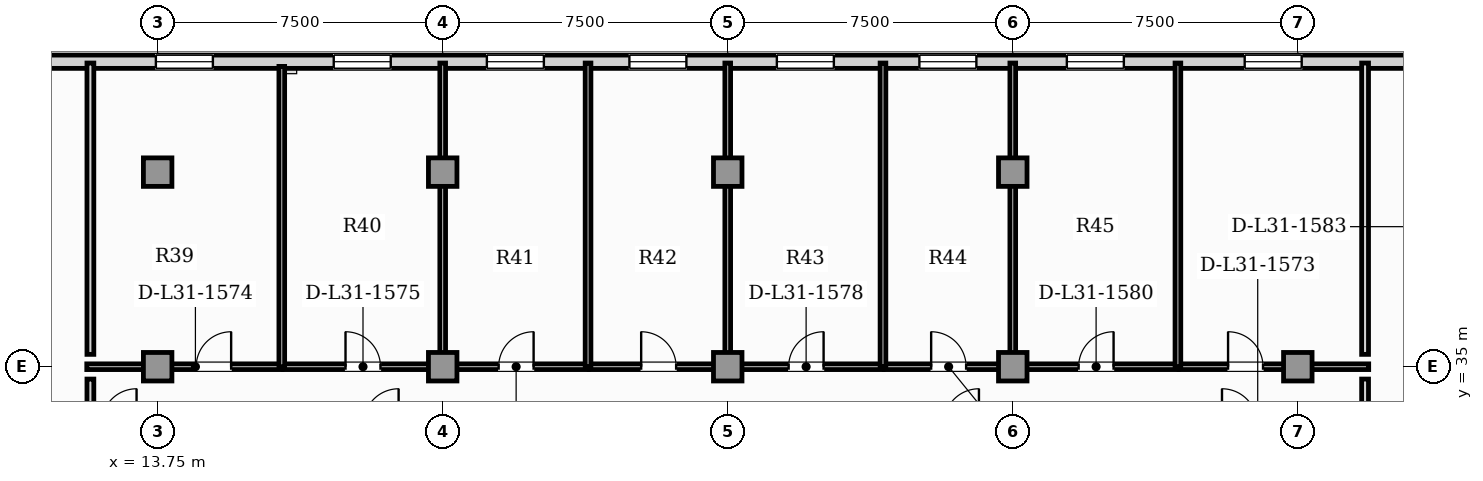
"""IFC4 building model, lengths in metres.
Left out: names, types, materials, properties, quantities, classifications, styles, units other than length and angle.
Written with IfcOpenShell. Run it as: python <this file> out.ifc"""

import sys

from ifc_helpers import new_model, si_unit, direction, frame, frame_2d, origin, origin_2d, place, context, subcontext, project, spatial, rectangle, extrude, element, fill, save


model = new_model("IFC4")
c1 = context("Model", 3, precision=1e-05, world=origin(), true_north=direction((0.0, 1.0)))
c2 = subcontext(c1, "Body", "Model", "MODEL_VIEW")
j1 = project(units=[si_unit("LENGTHUNIT", "METRE"), si_unit("PLANEANGLEUNIT", "RADIAN")], contexts=[c1])
p1 = place(None, origin())
s1 = spatial("IfcSite", under=j1, at=p1, CompositionType="ELEMENT")
p2 = place(p1, origin())
s2 = spatial("IfcBuilding", under=s1, at=p2, CompositionType="ELEMENT")
p3 = place(p2, frame((0.0, 0.0, 127.25)))
s3 = spatial("IfcBuildingStorey", under=s2, at=p3, CompositionType="ELEMENT", Elevation=127.25)
for number, where, z_axis, x_axis in (
    (1, (13.75, 40.12, 0.0), (0.0, 0.0, 1.0), (1.0, 0.0, 0.0)),
    (2, (21.25, 40.12, 0.0), (0.0, 0.0, 1.0), (1.0, 0.0, 0.0)),
    (3, (28.75, 40.12, 0.0), (0.0, 0.0, 1.0), (1.0, 0.0, 0.0)),
    (4, (36.25, 40.12, 0.0), (0.0, 0.0, 1.0), (1.0, 0.0, 0.0)),
    (5, (13.75, 35.0, 0.0), (0.0, 0.0, 1.0), (1.0, 0.0, 0.0)),
    (6, (21.25, 35.0, 0.0), (0.0, 0.0, 1.0), (1.0, 0.0, 0.0)),
    (7, (28.75, 35.0, 0.0), (0.0, 0.0, 1.0), (1.0, 0.0, 0.0)),
    (8, (36.25, 35.0, 0.0), (0.0, 0.0, 1.0), (1.0, 0.0, 0.0)),
    (9, (43.75, 35.0, 0.0), (0.0, 0.0, 1.0), (1.0, 0.0, 0.0)),
):
    element("IfcColumn", number, at=place(p3, frame(where, z_axis=z_axis, x_axis=x_axis)), inside=s3, PredefinedType="COLUMN", context=c2, shape_type="SweptSolid", body=[
        extrude(rectangle(XDim=0.75, YDim=0.75, at=origin_2d()), origin(), (0.0, 0.0, 1.0), 3.85),
    ])
p4 = place(p3, frame((51.66, 43.025, 0.0), z_axis=(0.0, 0.0, 1.0), x_axis=(-1.0, 0.0, 0.0)))
e10 = element("IfcWall", 10, at=p4, inside=s3, PredefinedType="SOLIDWALL", context=c2, shape_type="SweptSolid", body=[
    extrude(rectangle(XDim=45.82, YDim=0.35, at=frame_2d((22.91, 0.0))), origin(), (0.0, 0.0, 1.0), 3.6),
])
p5 = place(p4, frame((42.468, 0.0, 0.9)))
e11 = element("IfcOpeningElement", 11, at=p5, cuts=e10, PredefinedType="OPENING", context=c2, shape_type="SweptSolid", body=[
    extrude(rectangle(XDim=1.5, YDim=1.95, at=frame_2d((0.75, 0.975))), frame((0.0, 0.185, 0.0), z_axis=(0.0, -1.0, 0.0), x_axis=(1.0, 0.0, 0.0)), (0.0, 0.0, 1.0), 0.37),
])
p6 = place(p4, frame((1.853, 0.0, 0.9)))
e12 = element("IfcOpeningElement", 12, at=p6, cuts=e10, PredefinedType="OPENING", context=c2, shape_type="SweptSolid", body=[
    extrude(rectangle(XDim=1.5, YDim=1.95, at=frame_2d((0.75, 0.975))), frame((0.0, 0.185, 0.0), z_axis=(0.0, -1.0, 0.0), x_axis=(1.0, 0.0, 0.0)), (0.0, 0.0, 1.0), 0.37),
])
p7 = place(p4, frame((36.457, 0.0, 0.9)))
e13 = element("IfcOpeningElement", 13, at=p7, cuts=e10, PredefinedType="OPENING", context=c2, shape_type="SweptSolid", body=[
    extrude(rectangle(XDim=1.5, YDim=1.95, at=frame_2d((0.75, 0.975))), frame((0.0, 0.185, 0.0), z_axis=(0.0, -1.0, 0.0), x_axis=(1.0, 0.0, 0.0)), (0.0, 0.0, 1.0), 0.37),
])
p8 = place(p4, frame((31.777, 0.0, 0.9)))
e14 = element("IfcOpeningElement", 14, at=p8, cuts=e10, PredefinedType="OPENING", context=c2, shape_type="SweptSolid", body=[
    extrude(rectangle(XDim=1.5, YDim=1.95, at=frame_2d((0.75, 0.975))), frame((0.0, 0.185, 0.0), z_axis=(0.0, -1.0, 0.0), x_axis=(1.0, 0.0, 0.0)), (0.0, 0.0, 1.0), 0.37),
])
p9 = place(p4, frame((27.748, 0.0, 0.9)))
e15 = element("IfcOpeningElement", 15, at=p9, cuts=e10, PredefinedType="OPENING", context=c2, shape_type="SweptSolid", body=[
    extrude(rectangle(XDim=1.5, YDim=1.95, at=frame_2d((0.75, 0.975))), frame((0.0, 0.185, 0.0), z_axis=(0.0, -1.0, 0.0), x_axis=(1.0, 0.0, 0.0)), (0.0, 0.0, 1.0), 0.37),
])
p10 = place(p4, frame((23.998, 0.0, 0.9)))
e16 = element("IfcOpeningElement", 16, at=p10, cuts=e10, PredefinedType="OPENING", context=c2, shape_type="SweptSolid", body=[
    extrude(rectangle(XDim=1.5, YDim=1.95, at=frame_2d((0.75, 0.975))), frame((0.0, 0.185, 0.0), z_axis=(0.0, -1.0, 0.0), x_axis=(1.0, 0.0, 0.0)), (0.0, 0.0, 1.0), 0.37),
])
p11 = place(p4, frame((20.118, 0.0, 0.9)))
e17 = element("IfcOpeningElement", 17, at=p11, cuts=e10, PredefinedType="OPENING", context=c2, shape_type="SweptSolid", body=[
    extrude(rectangle(XDim=1.5, YDim=1.95, at=frame_2d((0.75, 0.975))), frame((0.0, 0.185, 0.0), z_axis=(0.0, -1.0, 0.0), x_axis=(1.0, 0.0, 0.0)), (0.0, 0.0, 1.0), 0.37),
])
p12 = place(p4, frame((16.368, 0.0, 0.9)))
e18 = element("IfcOpeningElement", 18, at=p12, cuts=e10, PredefinedType="OPENING", context=c2, shape_type="SweptSolid", body=[
    extrude(rectangle(XDim=1.5, YDim=1.95, at=frame_2d((0.75, 0.975))), frame((0.0, 0.185, 0.0), z_axis=(0.0, -1.0, 0.0), x_axis=(1.0, 0.0, 0.0)), (0.0, 0.0, 1.0), 0.37),
])
p13 = place(p4, frame((12.487, 0.0, 0.9)))
e19 = element("IfcOpeningElement", 19, at=p13, cuts=e10, PredefinedType="OPENING", context=c2, shape_type="SweptSolid", body=[
    extrude(rectangle(XDim=1.5, YDim=1.95, at=frame_2d((0.75, 0.975))), frame((0.0, 0.185, 0.0), z_axis=(0.0, -1.0, 0.0), x_axis=(1.0, 0.0, 0.0)), (0.0, 0.0, 1.0), 0.37),
])
p14 = place(p4, frame((7.807, 0.0, 0.9)))
e20 = element("IfcOpeningElement", 20, at=p14, cuts=e10, PredefinedType="OPENING", context=c2, shape_type="SweptSolid", body=[
    extrude(rectangle(XDim=1.5, YDim=1.95, at=frame_2d((0.75, 0.975))), frame((0.0, 0.185, 0.0), z_axis=(0.0, -1.0, 0.0), x_axis=(1.0, 0.0, 0.0)), (0.0, 0.0, 1.0), 0.37),
])
p15 = place(p3, frame((11.885, 35.0, 0.0), z_axis=(0.0, 0.0, 1.0), x_axis=(1.0, 0.0, 0.0)))
e21 = element("IfcWall", 21, at=p15, inside=s3, PredefinedType="PARTITIONING", context=c2, shape_type="SweptSolid", body=[
    extrude(rectangle(XDim=5.136, YDim=0.15, at=frame_2d((2.568, 0.0))), origin(), (0.0, 0.0, 1.0), 2.983),
])
p16 = place(p15, frame((2.878, 0.0, 0.0)))
e22 = element("IfcOpeningElement", 22, at=p16, cuts=e21, PredefinedType="OPENING", context=c2, shape_type="SweptSolid", body=[
    extrude(rectangle(XDim=0.92, YDim=2.1, at=frame_2d((0.46, 1.05))), frame((0.0, 0.085, 0.0), z_axis=(0.0, -1.0, 0.0), x_axis=(1.0, 0.0, 0.0)), (0.0, 0.0, 1.0), 0.17),
])
p17 = place(p3, frame((17.051, 35.0, 0.0), z_axis=(0.0, 0.0, 1.0), x_axis=(1.0, 0.0, 0.0)))
e23 = element("IfcWall", 23, at=p17, inside=s3, PredefinedType="PARTITIONING", context=c2, shape_type="SweptSolid", body=[
    extrude(rectangle(XDim=4.204, YDim=0.15, at=frame_2d((2.102, 0.0))), origin(), (0.0, 0.0, 1.0), 2.983),
])
p18 = place(p17, frame((1.642, 0.0, 0.0)))
e24 = element("IfcOpeningElement", 24, at=p18, cuts=e23, PredefinedType="OPENING", context=c2, shape_type="SweptSolid", body=[
    extrude(rectangle(XDim=0.92, YDim=2.1, at=frame_2d((0.46, 1.05))), frame((0.0, 0.085, 0.0), z_axis=(0.0, -1.0, 0.0), x_axis=(1.0, 0.0, 0.0)), (0.0, 0.0, 1.0), 0.17),
])
p19 = place(p3, frame((21.285, 35.0, 0.0), z_axis=(0.0, 0.0, 1.0), x_axis=(1.0, 0.0, 0.0)))
e25 = element("IfcWall", 25, at=p19, inside=s3, PredefinedType="PARTITIONING", context=c2, shape_type="SweptSolid", body=[
    extrude(rectangle(XDim=3.795, YDim=0.15, at=frame_2d((1.897, 0.0))), origin(), (0.0, 0.0, 1.0), 2.983),
])
p20 = place(p19, frame((1.437, 0.0, 0.0)))
e26 = element("IfcOpeningElement", 26, at=p20, cuts=e25, PredefinedType="OPENING", context=c2, shape_type="SweptSolid", body=[
    extrude(rectangle(XDim=0.92, YDim=2.1, at=frame_2d((0.46, 1.05))), frame((0.0, 0.085, 0.0), z_axis=(0.0, -1.0, 0.0), x_axis=(1.0, 0.0, 0.0)), (0.0, 0.0, 1.0), 0.17),
])
p21 = place(p3, frame((25.11, 35.0, 0.0), z_axis=(0.0, 0.0, 1.0), x_axis=(1.0, 0.0, 0.0)))
e27 = element("IfcWall", 27, at=p21, inside=s3, PredefinedType="PARTITIONING", context=c2, shape_type="SweptSolid", body=[
    extrude(rectangle(XDim=3.645, YDim=0.15, at=frame_2d((1.823, 0.0))), origin(), (0.0, 0.0, 1.0), 2.983),
])
p22 = place(p21, frame((1.363, 0.0, 0.0)))
e28 = element("IfcOpeningElement", 28, at=p22, cuts=e27, PredefinedType="OPENING", context=c2, shape_type="SweptSolid", body=[
    extrude(rectangle(XDim=0.92, YDim=2.1, at=frame_2d((0.46, 1.05))), frame((0.0, 0.085, 0.0), z_axis=(0.0, -1.0, 0.0), x_axis=(1.0, 0.0, 0.0)), (0.0, 0.0, 1.0), 0.17),
])
p23 = place(p3, frame((28.785, 35.0, 0.0), z_axis=(0.0, 0.0, 1.0), x_axis=(1.0, 0.0, 0.0)))
e29 = element("IfcWall", 29, at=p23, inside=s3, PredefinedType="PARTITIONING", context=c2, shape_type="SweptSolid", body=[
    extrude(rectangle(XDim=4.055, YDim=0.15, at=frame_2d((2.027, 0.0))), origin(), (0.0, 0.0, 1.0), 2.983),
])
p24 = place(p23, frame((1.567, 0.0, 0.0)))
e30 = element("IfcOpeningElement", 30, at=p24, cuts=e29, PredefinedType="OPENING", context=c2, shape_type="SweptSolid", body=[
    extrude(rectangle(XDim=0.92, YDim=2.1, at=frame_2d((0.46, 1.05))), frame((0.0, 0.085, 0.0), z_axis=(0.0, -1.0, 0.0), x_axis=(1.0, 0.0, 0.0)), (0.0, 0.0, 1.0), 0.17),
])
p25 = place(p3, frame((32.87, 35.0, 0.0), z_axis=(0.0, 0.0, 1.0), x_axis=(1.0, 0.0, 0.0)))
e31 = element("IfcWall", 31, at=p25, inside=s3, PredefinedType="PARTITIONING", context=c2, shape_type="SweptSolid", body=[
    extrude(rectangle(XDim=3.385, YDim=0.15, at=frame_2d((1.692, 0.0))), origin(), (0.0, 0.0, 1.0), 2.983),
])
p26 = place(p25, frame((1.233, 0.0, 0.0)))
e32 = element("IfcOpeningElement", 32, at=p26, cuts=e31, PredefinedType="OPENING", context=c2, shape_type="SweptSolid", body=[
    extrude(rectangle(XDim=0.92, YDim=2.1, at=frame_2d((0.46, 1.05))), frame((0.0, 0.085, 0.0), z_axis=(0.0, -1.0, 0.0), x_axis=(1.0, 0.0, 0.0)), (0.0, 0.0, 1.0), 0.17),
])
p27 = place(p3, frame((36.285, 35.0, 0.0), z_axis=(0.0, 0.0, 1.0), x_axis=(1.0, 0.0, 0.0)))
e33 = element("IfcWall", 33, at=p27, inside=s3, PredefinedType="PARTITIONING", context=c2, shape_type="SweptSolid", body=[
    extrude(rectangle(XDim=4.315, YDim=0.15, at=frame_2d((2.158, 0.0))), origin(), (0.0, 0.0, 1.0), 2.983),
])
p28 = place(p27, frame((1.698, 0.0, 0.0)))
e34 = element("IfcOpeningElement", 34, at=p28, cuts=e33, PredefinedType="OPENING", context=c2, shape_type="SweptSolid", body=[
    extrude(rectangle(XDim=0.92, YDim=2.1, at=frame_2d((0.46, 1.05))), frame((0.0, 0.085, 0.0), z_axis=(0.0, -1.0, 0.0), x_axis=(1.0, 0.0, 0.0)), (0.0, 0.0, 1.0), 0.17),
])
p29 = place(p3, frame((40.63, 35.0, 0.0), z_axis=(0.0, 0.0, 1.0), x_axis=(1.0, 0.0, 0.0)))
e35 = element("IfcWall", 35, at=p29, inside=s3, PredefinedType="PARTITIONING", context=c2, shape_type="SweptSolid", body=[
    extrude(rectangle(XDim=4.985, YDim=0.15, at=frame_2d((2.492, 0.0))), origin(), (0.0, 0.0, 1.0), 2.983),
])
p30 = place(p29, frame((1.285, 0.0, 0.0)))
e36 = element("IfcOpeningElement", 36, at=p30, cuts=e35, PredefinedType="OPENING", context=c2, shape_type="SweptSolid", body=[
    extrude(rectangle(XDim=0.92, YDim=2.1, at=frame_2d((0.46, 1.05))), frame((0.0, 0.085, 0.0), z_axis=(0.0, -1.0, 0.0), x_axis=(1.0, 0.0, 0.0)), (0.0, 0.0, 1.0), 0.17),
])
p31 = place(p3, frame((17.016, 34.995, 0.0), z_axis=(0.0, 0.0, 1.0), x_axis=(0.0, 1.0, 0.0)))
e37 = element("IfcWall", 37, at=p31, inside=s3, PredefinedType="PARTITIONING", context=c2, shape_type="SweptSolid", body=[
    extrude(rectangle(XDim=7.907, YDim=0.15, at=frame_2d((3.954, 0.0))), origin(), (0.0, 0.0, 1.0), 3.6),
])
for number, where, z_axis, x_axis in (
    (38, (21.25, 34.995, 0.0), (0.0, 0.0, 1.0), (0.0, 1.0, 0.0)),
    (39, (25.074, 34.995, 0.0), (0.0, 0.0, 1.0), (0.0, 1.0, 0.0)),
    (40, (28.75, 34.995, 0.0), (0.0, 0.0, 1.0), (0.0, 1.0, 0.0)),
    (41, (32.835, 34.995, 0.0), (0.0, 0.0, 1.0), (0.0, 1.0, 0.0)),
    (42, (36.25, 34.995, 0.0), (0.0, 0.0, 1.0), (0.0, 1.0, 0.0)),
    (43, (40.595, 34.995, 0.0), (0.0, 0.0, 1.0), (0.0, 1.0, 0.0)),
):
    element("IfcWall", number, at=place(p3, frame(where, z_axis=z_axis, x_axis=x_axis)), inside=s3, PredefinedType="PARTITIONING", context=c2, shape_type="SweptSolid", body=[
        extrude(rectangle(XDim=7.995, YDim=0.15, at=frame_2d((3.998, 0.0))), origin(), (0.0, 0.0, 1.0), 3.6),
    ])
for number, where, z_axis, x_axis in (
    (44, (11.98, 33.825, 0.0), (0.0, 0.0, 1.0), (0.0, 1.0, 0.0)),
    (45, (45.52, 34.675, 0.0), (0.0, 0.0, 1.0), (0.0, -1.0, 0.0)),
):
    element("IfcWall", number, at=place(p3, frame(where, z_axis=z_axis, x_axis=x_axis)), inside=s3, PredefinedType="PARTITIONING", context=c2, shape_type="SweptSolid", body=[
        extrude(rectangle(XDim=0.85, YDim=0.18, at=frame_2d((0.425, 0.0))), origin(), (0.0, 0.0, 1.0), 3.6),
    ])
for number, where, z_axis, x_axis in (
    (46, (11.98, 35.325, 0.0), (0.0, 0.0, 1.0), (0.0, 1.0, 0.0)),
    (47, (45.52, 42.99, 0.0), (0.0, 0.0, 1.0), (0.0, -1.0, 0.0)),
):
    element("IfcWall", number, at=place(p3, frame(where, z_axis=z_axis, x_axis=x_axis)), inside=s3, PredefinedType="PARTITIONING", context=c2, shape_type="SweptSolid", body=[
        extrude(rectangle(XDim=7.665, YDim=0.18, at=frame_2d((3.833, 0.0))), origin(), (0.0, 0.0, 1.0), 3.6),
    ])
p32 = place(p7, origin())
e48 = element("IfcWindow", 48, at=p32, inside=s3, PartitioningType="SINGLE_PANEL", PredefinedType="WINDOW", context=c2, shape_type="SweptSolid", body=[
    extrude(rectangle(XDim=1.5, YDim=1.95, at=frame_2d((0.75, 0.975))), frame((0.0, 0.03, 0.0), z_axis=(0.0, -1.0, 0.0), x_axis=(1.0, 0.0, 0.0)), (0.0, 0.0, 1.0), 0.06),
])
fill(e13, e48)
p33 = place(p8, origin())
e49 = element("IfcWindow", 49, at=p33, inside=s3, PartitioningType="SINGLE_PANEL", PredefinedType="WINDOW", context=c2, shape_type="SweptSolid", body=[
    extrude(rectangle(XDim=1.5, YDim=1.95, at=frame_2d((0.75, 0.975))), frame((0.0, 0.03, 0.0), z_axis=(0.0, -1.0, 0.0), x_axis=(1.0, 0.0, 0.0)), (0.0, 0.0, 1.0), 0.06),
])
fill(e14, e49)
p34 = place(p9, origin())
e50 = element("IfcWindow", 50, at=p34, inside=s3, PartitioningType="SINGLE_PANEL", PredefinedType="WINDOW", context=c2, shape_type="SweptSolid", body=[
    extrude(rectangle(XDim=1.5, YDim=1.95, at=frame_2d((0.75, 0.975))), frame((0.0, 0.03, 0.0), z_axis=(0.0, -1.0, 0.0), x_axis=(1.0, 0.0, 0.0)), (0.0, 0.0, 1.0), 0.06),
])
fill(e15, e50)
p35 = place(p10, origin())
e51 = element("IfcWindow", 51, at=p35, inside=s3, PartitioningType="SINGLE_PANEL", PredefinedType="WINDOW", context=c2, shape_type="SweptSolid", body=[
    extrude(rectangle(XDim=1.5, YDim=1.95, at=frame_2d((0.75, 0.975))), frame((0.0, 0.03, 0.0), z_axis=(0.0, -1.0, 0.0), x_axis=(1.0, 0.0, 0.0)), (0.0, 0.0, 1.0), 0.06),
])
fill(e16, e51)
p36 = place(p11, origin())
e52 = element("IfcWindow", 52, at=p36, inside=s3, PartitioningType="SINGLE_PANEL", PredefinedType="WINDOW", context=c2, shape_type="SweptSolid", body=[
    extrude(rectangle(XDim=1.5, YDim=1.95, at=frame_2d((0.75, 0.975))), frame((0.0, 0.03, 0.0), z_axis=(0.0, -1.0, 0.0), x_axis=(1.0, 0.0, 0.0)), (0.0, 0.0, 1.0), 0.06),
])
fill(e17, e52)
p37 = place(p12, origin())
e53 = element("IfcWindow", 53, at=p37, inside=s3, PartitioningType="SINGLE_PANEL", PredefinedType="WINDOW", context=c2, shape_type="SweptSolid", body=[
    extrude(rectangle(XDim=1.5, YDim=1.95, at=frame_2d((0.75, 0.975))), frame((0.0, 0.03, 0.0), z_axis=(0.0, -1.0, 0.0), x_axis=(1.0, 0.0, 0.0)), (0.0, 0.0, 1.0), 0.06),
])
fill(e18, e53)
p38 = place(p13, origin())
e54 = element("IfcWindow", 54, at=p38, inside=s3, PartitioningType="SINGLE_PANEL", PredefinedType="WINDOW", context=c2, shape_type="SweptSolid", body=[
    extrude(rectangle(XDim=1.5, YDim=1.95, at=frame_2d((0.75, 0.975))), frame((0.0, 0.03, 0.0), z_axis=(0.0, -1.0, 0.0), x_axis=(1.0, 0.0, 0.0)), (0.0, 0.0, 1.0), 0.06),
])
fill(e19, e54)
p39 = place(p14, origin())
e55 = element("IfcWindow", 55, at=p39, inside=s3, PartitioningType="SINGLE_PANEL", PredefinedType="WINDOW", context=c2, shape_type="SweptSolid", body=[
    extrude(rectangle(XDim=1.5, YDim=1.95, at=frame_2d((0.75, 0.975))), frame((0.0, 0.03, 0.0), z_axis=(0.0, -1.0, 0.0), x_axis=(1.0, 0.0, 0.0)), (0.0, 0.0, 1.0), 0.06),
])
fill(e20, e55)
p40 = place(p16, origin())
e56 = element("IfcDoor", 56, at=p40, inside=s3, OperationType="SINGLE_SWING_RIGHT", PredefinedType="DOOR", context=c2, shape_type="SweptSolid", body=[
    extrude(rectangle(XDim=0.92, YDim=2.1, at=frame_2d((0.46, 1.05))), frame((0.0, 0.025, 0.0), z_axis=(0.0, -1.0, 0.0), x_axis=(1.0, 0.0, 0.0)), (0.0, 0.0, 1.0), 0.05),
])
fill(e22, e56)
p41 = place(p18, origin())
e57 = element("IfcDoor", 57, at=p41, inside=s3, OperationType="SINGLE_SWING_LEFT", PredefinedType="DOOR", context=c2, shape_type="SweptSolid", body=[
    extrude(rectangle(XDim=0.92, YDim=2.1, at=frame_2d((0.46, 1.05))), frame((0.0, 0.025, 0.0), z_axis=(0.0, -1.0, 0.0), x_axis=(1.0, 0.0, 0.0)), (0.0, 0.0, 1.0), 0.05),
])
fill(e24, e57)
p42 = place(p20, origin())
e58 = element("IfcDoor", 58, at=p42, inside=s3, OperationType="SINGLE_SWING_RIGHT", PredefinedType="DOOR", context=c2, shape_type="SweptSolid", body=[
    extrude(rectangle(XDim=0.92, YDim=2.1, at=frame_2d((0.46, 1.05))), frame((0.0, 0.025, 0.0), z_axis=(0.0, -1.0, 0.0), x_axis=(1.0, 0.0, 0.0)), (0.0, 0.0, 1.0), 0.05),
])
fill(e26, e58)
p43 = place(p22, origin())
e59 = element("IfcDoor", 59, at=p43, inside=s3, OperationType="SINGLE_SWING_LEFT", PredefinedType="DOOR", context=c2, shape_type="SweptSolid", body=[
    extrude(rectangle(XDim=0.92, YDim=2.1, at=frame_2d((0.46, 1.05))), frame((0.0, 0.025, 0.0), z_axis=(0.0, -1.0, 0.0), x_axis=(1.0, 0.0, 0.0)), (0.0, 0.0, 1.0), 0.05),
])
fill(e28, e59)
p44 = place(p24, origin())
e60 = element("IfcDoor", 60, at=p44, inside=s3, OperationType="SINGLE_SWING_RIGHT", PredefinedType="DOOR", context=c2, shape_type="SweptSolid", body=[
    extrude(rectangle(XDim=0.92, YDim=2.1, at=frame_2d((0.46, 1.05))), frame((0.0, 0.025, 0.0), z_axis=(0.0, -1.0, 0.0), x_axis=(1.0, 0.0, 0.0)), (0.0, 0.0, 1.0), 0.05),
])
fill(e30, e60)
p45 = place(p26, origin())
e61 = element("IfcDoor", 61, at=p45, inside=s3, OperationType="SINGLE_SWING_LEFT", PredefinedType="DOOR", context=c2, shape_type="SweptSolid", body=[
    extrude(rectangle(XDim=0.92, YDim=2.1, at=frame_2d((0.46, 1.05))), frame((0.0, 0.025, 0.0), z_axis=(0.0, -1.0, 0.0), x_axis=(1.0, 0.0, 0.0)), (0.0, 0.0, 1.0), 0.05),
])
fill(e32, e61)
p46 = place(p28, origin())
e62 = element("IfcDoor", 62, at=p46, inside=s3, OperationType="SINGLE_SWING_RIGHT", PredefinedType="DOOR", context=c2, shape_type="SweptSolid", body=[
    extrude(rectangle(XDim=0.92, YDim=2.1, at=frame_2d((0.46, 1.05))), frame((0.0, 0.025, 0.0), z_axis=(0.0, -1.0, 0.0), x_axis=(1.0, 0.0, 0.0)), (0.0, 0.0, 1.0), 0.05),
])
fill(e34, e62)
p47 = place(p30, origin())
e63 = element("IfcDoor", 63, at=p47, inside=s3, OperationType="SINGLE_SWING_LEFT", PredefinedType="DOOR", context=c2, shape_type="SweptSolid", body=[
    extrude(rectangle(XDim=0.92, YDim=2.1, at=frame_2d((0.46, 1.05))), frame((0.0, 0.025, 0.0), z_axis=(0.0, -1.0, 0.0), x_axis=(1.0, 0.0, 0.0)), (0.0, 0.0, 1.0), 0.05),
])
fill(e36, e63)
save(model, sys.argv[1])
